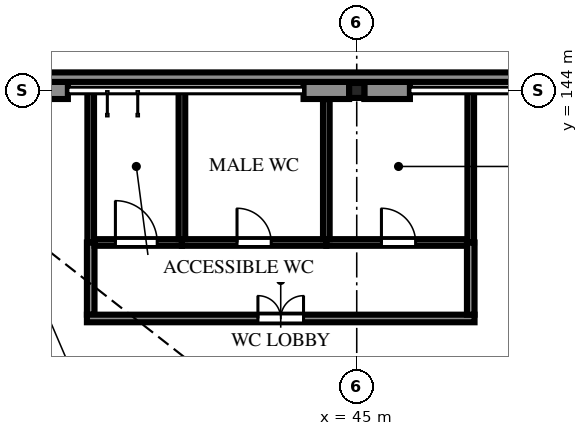
"""IFC4 building model, lengths in metres.
Left out: names, types, materials, properties, quantities, classifications, styles, units other than length and angle.
Written with IfcOpenShell. Run it as: python <this file> out.ifc"""

import sys

from ifc_helpers import new_model, si_unit, direction, frame, frame_2d, origin, origin_2d, place, context, subcontext, project, spatial, polyline, rectangle, i_section, outline, extrude, element, fill, save


model = new_model("IFC4")
c1 = context("Model", 3, precision=1e-05, world=origin(), true_north=direction((0.0, 1.0)))
c2 = subcontext(c1, "Body", "Model", "MODEL_VIEW")
j1 = project(units=[si_unit("LENGTHUNIT", "METRE"), si_unit("PLANEANGLEUNIT", "RADIAN")], contexts=[c1])
p1 = place(None, origin())
s1 = spatial("IfcSite", under=j1, at=p1, CompositionType="ELEMENT")
p2 = place(p1, origin())
s2 = spatial("IfcBuilding", under=s1, at=p2, CompositionType="ELEMENT")
p3 = place(p2, origin())
s3 = spatial("IfcBuildingStorey", under=s2, at=p3, CompositionType="ELEMENT", Elevation=0.0)
p4 = place(p3, frame((45.0, 144.0, -2.1), z_axis=(0.0, 0.0, 1.0), x_axis=(1.0, 0.0, 0.0)))
e1 = element("IfcColumn", 1, at=p4, inside=s3, PredefinedType="COLUMN", context=c2, shape_type="SweptSolid", body=[
    extrude(i_section(OverallWidth=0.399, OverallDepth=0.394, WebThickness=0.016, FlangeThickness=0.025, FilletRadius=0.015, at=origin_2d()), origin(), (0.0, 0.0, 1.0), 9.6),
])
for number, where, z_axis, x_axis in (
    (2, (36.199, 144.0, 0.0), (0.0, 0.0, 1.0), (1.0, 0.0, 0.0)),
    (3, (43.601, 144.0, 0.0), (0.0, 0.0, 1.0), (1.0, 0.0, 0.0)),
    (4, (45.199, 144.0, 0.0), (0.0, 0.0, 1.0), (1.0, 0.0, 0.0)),
):
    element("IfcWall", number, at=place(p3, frame(where, z_axis=z_axis, x_axis=x_axis)), inside=s3, PredefinedType="SOLIDWALL", context=c2, shape_type="SweptSolid", body=[
        extrude(rectangle(XDim=1.2, YDim=0.45, at=frame_2d((0.6, 0.0))), origin(), (0.0, 0.0, 1.0), 6.46),
    ])
p5 = place(p3, frame((33.15, 144.35, 0.0), z_axis=(0.0, 0.0, 1.0), x_axis=(1.0, 0.0, 0.0)))
e5 = element("IfcWall", 5, at=p5, inside=s3, PredefinedType="SOLIDWALL", context=c2, shape_type="SweptSolid", body=[
    extrude(outline(polyline([(4.25, 0.0), (4.25, 3.3), (4.374, 4.028), (4.87, 4.652), (5.304, 4.808), (5.676, 5.224), (6.482, 5.64), (7.35, 5.9), (8.218, 5.64), (9.024, 5.224), (9.396, 4.808), (9.83, 4.652), (10.326, 4.028), (10.45, 3.3), (10.45, 0.0), (13.25, 0.0), (13.25, 3.3), (13.374, 4.028), (13.87, 4.652), (14.304, 4.808), (14.676, 5.224), (15.482, 5.64), (16.35, 5.9), (17.218, 5.64), (18.024, 5.224), (18.396, 4.808), (18.83, 4.652), (19.326, 4.028), (19.45, 3.3), (19.45, 0.0), (20.85, 0.0), (20.85, 6.46), (0.0, 6.46), (0.0, 0.0), (4.25, 0.0)])), frame((0.0, 0.125, 0.0), z_axis=(0.0, -1.0, 0.0), x_axis=(1.0, 0.0, 0.0)), (0.0, 0.0, 1.0), 0.25),
])
p6 = place(p3, frame((38.0, 140.0, 0.0), z_axis=(0.0, 0.0, 1.0), x_axis=(0.0, -1.0, 0.0)))
e6 = element("IfcWall", 6, at=p6, inside=s3, PredefinedType="PARTITIONING", context=c2, shape_type="SweptSolid", body=[
    extrude(rectangle(XDim=1.9, YDim=0.2, at=frame_2d((0.95, 0.0))), origin(), (0.0, 0.0, 1.0), 6.6),
])
p7 = place(p3, frame((37.9, 138.0, 0.0), z_axis=(0.0, 0.0, 1.0), x_axis=(1.0, 0.0, 0.0)))
e7 = element("IfcWall", 7, at=p7, inside=s3, PredefinedType="PARTITIONING", context=c2, shape_type="SweptSolid", body=[
    extrude(rectangle(XDim=10.2, YDim=0.2, at=frame_2d((5.1, 0.0))), origin(), (0.0, 0.0, 1.0), 6.6),
])
p8 = place(p7, frame((4.5, 0.0, 0.0)))
e8 = element("IfcOpeningElement", 8, at=p8, cuts=e7, PredefinedType="OPENING", context=c2, shape_type="SweptSolid", body=[
    extrude(rectangle(XDim=1.2, YDim=2.1, at=frame_2d((0.6, 1.05))), frame((0.0, 0.11, 0.0), z_axis=(0.0, -1.0, 0.0), x_axis=(1.0, 0.0, 0.0)), (0.0, 0.0, 1.0), 0.22),
])
p9 = place(p3, frame((48.0, 138.1, 0.0), z_axis=(0.0, 0.0, 1.0), x_axis=(0.0, 1.0, 0.0)))
e9 = element("IfcWall", 9, at=p9, inside=s3, PredefinedType="PARTITIONING", context=c2, shape_type="SweptSolid", body=[
    extrude(rectangle(XDim=1.9, YDim=0.2, at=frame_2d((0.95, 0.0))), origin(), (0.0, 0.0, 1.0), 6.6),
])
for number, where, z_axis, x_axis in (
    (10, (38.0, 144.0, 0.0), (0.0, 0.0, 1.0), (0.0, -1.0, 0.0)),
    (11, (48.0, 140.0, 0.0), (0.0, 0.0, 1.0), (0.0, 1.0, 0.0)),
):
    element("IfcWall", number, at=place(p3, frame(where, z_axis=z_axis, x_axis=x_axis)), inside=s3, PredefinedType="PARTITIONING", context=c2, shape_type="SweptSolid", body=[
        extrude(rectangle(XDim=4.0, YDim=0.175, at=frame_2d((2.0, 0.0))), origin(), (0.0, 0.0, 1.0), 6.459),
    ])
p10 = place(p3, frame((38.1, 140.0, 0.0), z_axis=(0.0, 0.0, 1.0), x_axis=(1.0, 0.0, 0.0)))
e12 = element("IfcWall", 12, at=p10, inside=s3, PredefinedType="PARTITIONING", context=c2, shape_type="SweptSolid", body=[
    extrude(rectangle(XDim=2.3, YDim=0.175, at=frame_2d((1.15, 0.0))), origin(), (0.0, 0.0, 1.0), 6.459),
])
p11 = place(p10, frame((0.55, 0.0, 0.0)))
e13 = element("IfcOpeningElement", 13, at=p11, cuts=e12, PredefinedType="OPENING", context=c2, shape_type="SweptSolid", body=[
    extrude(rectangle(XDim=1.1, YDim=2.1, at=frame_2d((0.55, 1.05))), frame((0.0, 0.097, 0.0), z_axis=(0.0, -1.0, 0.0), x_axis=(1.0, 0.0, 0.0)), (0.0, 0.0, 1.0), 0.195),
])
p12 = place(p3, frame((40.4, 140.0, 0.0), z_axis=(0.0, 0.0, 1.0), x_axis=(1.0, 0.0, 0.0)))
e14 = element("IfcWall", 14, at=p12, inside=s3, PredefinedType="PARTITIONING", context=c2, shape_type="SweptSolid", body=[
    extrude(rectangle(XDim=3.8, YDim=0.175, at=frame_2d((1.9, 0.0))), origin(), (0.0, 0.0, 1.0), 6.459),
])
p13 = place(p12, frame((1.45, 0.0, 0.0)))
e15 = element("IfcOpeningElement", 15, at=p13, cuts=e14, PredefinedType="OPENING", context=c2, shape_type="SweptSolid", body=[
    extrude(rectangle(XDim=0.9, YDim=2.1, at=frame_2d((0.45, 1.05))), frame((0.0, 0.097, 0.0), z_axis=(0.0, -1.0, 0.0), x_axis=(1.0, 0.0, 0.0)), (0.0, 0.0, 1.0), 0.195),
])
p14 = place(p3, frame((44.2, 140.0, 0.0), z_axis=(0.0, 0.0, 1.0), x_axis=(1.0, 0.0, 0.0)))
e16 = element("IfcWall", 16, at=p14, inside=s3, PredefinedType="PARTITIONING", context=c2, shape_type="SweptSolid", body=[
    extrude(rectangle(XDim=3.7, YDim=0.175, at=frame_2d((1.85, 0.0))), origin(), (0.0, 0.0, 1.0), 6.459),
])
p15 = place(p14, frame((1.45, 0.0, 0.0)))
e17 = element("IfcOpeningElement", 17, at=p15, cuts=e16, PredefinedType="OPENING", context=c2, shape_type="SweptSolid", body=[
    extrude(rectangle(XDim=0.9, YDim=2.1, at=frame_2d((0.45, 1.05))), frame((0.0, 0.097, 0.0), z_axis=(0.0, -1.0, 0.0), x_axis=(1.0, 0.0, 0.0)), (0.0, 0.0, 1.0), 0.195),
])
p16 = place(p3, frame((40.4, 144.0, 0.0), z_axis=(0.0, 0.0, 1.0), x_axis=(0.0, -1.0, 0.0)))
e18 = element("IfcWall", 18, at=p16, inside=s3, PredefinedType="PARTITIONING", context=c2, shape_type="SweptSolid", body=[
    extrude(rectangle(XDim=3.913, YDim=0.175, at=frame_2d((1.956, 0.0))), origin(), (0.0, 0.0, 1.0), 6.459),
])
p17 = place(p3, frame((44.2, 143.773, 0.0), z_axis=(0.0, 0.0, 1.0), x_axis=(0.0, -1.0, 0.0)))
e19 = element("IfcWall", 19, at=p17, inside=s3, PredefinedType="PARTITIONING", context=c2, shape_type="SweptSolid", body=[
    extrude(rectangle(XDim=3.686, YDim=0.175, at=frame_2d((1.843, 0.0))), origin(), (0.0, 0.0, 1.0), 6.459),
])
p18 = place(p8, origin())
e20 = element("IfcDoor", 20, at=p18, inside=s3, OperationType="DOUBLE_DOOR_SINGLE_SWING", PredefinedType="DOOR", context=c2, shape_type="SweptSolid", body=[
    extrude(outline(polyline([(0.0, 0.0), (0.07, 0.0), (0.07, 2.03), (1.13, 2.03), (1.13, 0.0), (1.2, 0.0), (1.2, 2.1), (0.0, 2.1), (0.0, 0.0)])), frame((0.0, 0.025, 0.0), z_axis=(0.0, -1.0, 0.0), x_axis=(1.0, 0.0, 0.0)), (0.0, 0.0, 1.0), 0.05),
    extrude(outline(polyline([(0.074, 0.01), (0.597, 0.01), (0.597, 2.026), (0.074, 2.026), (0.074, 0.01)]), holes=[polyline([(0.178, 0.373), (0.492, 0.373), (0.492, 1.784), (0.178, 1.784), (0.178, 0.373)])]), frame((0.0, 0.017, 0.0), z_axis=(0.0, -1.0, 0.0), x_axis=(1.0, 0.0, 0.0)), (0.0, 0.0, 1.0), 0.035),
    extrude(rectangle(XDim=0.314, YDim=1.411, at=frame_2d((0.335, 1.079))), frame((0.0, 0.009, 0.0), z_axis=(0.0, -1.0, 0.0), x_axis=(1.0, 0.0, 0.0)), (0.0, 0.0, 1.0), 0.017),
    extrude(outline(polyline([(0.603, 0.01), (1.126, 0.01), (1.126, 2.026), (0.603, 2.026), (0.603, 0.01)]), holes=[polyline([(0.708, 0.373), (1.021, 0.373), (1.021, 1.784), (0.708, 1.784), (0.708, 0.373)])]), frame((0.0, 0.017, 0.0), z_axis=(0.0, -1.0, 0.0), x_axis=(1.0, 0.0, 0.0)), (0.0, 0.0, 1.0), 0.035),
    extrude(rectangle(XDim=0.314, YDim=1.411, at=frame_2d((0.865, 1.079))), frame((0.0, 0.009, 0.0), z_axis=(0.0, -1.0, 0.0), x_axis=(1.0, 0.0, 0.0)), (0.0, 0.0, 1.0), 0.017),
])
fill(e8, e20)
p19 = place(p11, origin())
e21 = element("IfcDoor", 21, at=p19, inside=s3, OperationType="SINGLE_SWING_LEFT", PredefinedType="DOOR", context=c2, shape_type="SweptSolid", body=[
    extrude(outline(polyline([(0.0, 0.0), (0.07, 0.0), (0.07, 2.03), (1.03, 2.03), (1.03, 0.0), (1.1, 0.0), (1.1, 2.1), (0.0, 2.1), (0.0, 0.0)])), frame((0.0, 0.025, 0.0), z_axis=(0.0, -1.0, 0.0), x_axis=(1.0, 0.0, 0.0)), (0.0, 0.0, 1.0), 0.05),
    extrude(outline(polyline([(0.074, 0.01), (1.026, 0.01), (1.026, 2.026), (0.074, 2.026), (0.074, 0.01)]), holes=[polyline([(0.194, 0.16), (0.906, 0.16), (0.906, 1.01), (0.194, 1.01), (0.194, 0.16)]), polyline([(0.4, 1.16), (0.7, 1.16), (0.7, 1.76), (0.4, 1.76), (0.4, 1.16)])]), frame((0.0, 0.017, 0.0), z_axis=(0.0, -1.0, 0.0), x_axis=(1.0, 0.0, 0.0)), (0.0, 0.0, 1.0), 0.035),
    extrude(rectangle(XDim=0.712, YDim=0.85, at=frame_2d((0.55, 0.585))), frame((0.0, 0.009, 0.0), z_axis=(0.0, -1.0, 0.0), x_axis=(1.0, 0.0, 0.0)), (0.0, 0.0, 1.0), 0.017),
    extrude(rectangle(XDim=0.3, YDim=0.6, at=frame_2d((0.55, 1.46))), frame((0.0, 0.006, 0.0), z_axis=(0.0, -1.0, 0.0), x_axis=(1.0, 0.0, 0.0)), (0.0, 0.0, 1.0), 0.012),
])
fill(e13, e21)
p20 = place(p13, origin())
e22 = element("IfcDoor", 22, at=p20, inside=s3, OperationType="SINGLE_SWING_LEFT", PredefinedType="DOOR", context=c2, shape_type="SweptSolid", body=[
    extrude(outline(polyline([(0.0, 0.0), (0.07, 0.0), (0.07, 2.03), (0.83, 2.03), (0.83, 0.0), (0.9, 0.0), (0.9, 2.1), (0.0, 2.1), (0.0, 0.0)])), frame((0.0, 0.025, 0.0), z_axis=(0.0, -1.0, 0.0), x_axis=(1.0, 0.0, 0.0)), (0.0, 0.0, 1.0), 0.05),
    extrude(outline(polyline([(0.074, 0.01), (0.826, 0.01), (0.826, 2.026), (0.074, 2.026), (0.074, 0.01)]), holes=[polyline([(0.194, 0.16), (0.706, 0.16), (0.706, 1.01), (0.194, 1.01), (0.194, 0.16)]), polyline([(0.3, 1.16), (0.6, 1.16), (0.6, 1.76), (0.3, 1.76), (0.3, 1.16)])]), frame((0.0, 0.017, 0.0), z_axis=(0.0, -1.0, 0.0), x_axis=(1.0, 0.0, 0.0)), (0.0, 0.0, 1.0), 0.035),
    extrude(rectangle(XDim=0.512, YDim=0.85, at=frame_2d((0.45, 0.585))), frame((0.0, 0.009, 0.0), z_axis=(0.0, -1.0, 0.0), x_axis=(1.0, 0.0, 0.0)), (0.0, 0.0, 1.0), 0.017),
    extrude(rectangle(XDim=0.3, YDim=0.6, at=frame_2d((0.45, 1.46))), frame((0.0, 0.006, 0.0), z_axis=(0.0, -1.0, 0.0), x_axis=(1.0, 0.0, 0.0)), (0.0, 0.0, 1.0), 0.012),
])
fill(e15, e22)
p21 = place(p15, origin())
e23 = element("IfcDoor", 23, at=p21, inside=s3, OperationType="SINGLE_SWING_LEFT", PredefinedType="DOOR", context=c2, shape_type="SweptSolid", body=[
    extrude(outline(polyline([(0.0, 0.0), (0.07, 0.0), (0.07, 2.03), (0.83, 2.03), (0.83, 0.0), (0.9, 0.0), (0.9, 2.1), (0.0, 2.1), (0.0, 0.0)])), frame((0.0, 0.025, 0.0), z_axis=(0.0, -1.0, 0.0), x_axis=(1.0, 0.0, 0.0)), (0.0, 0.0, 1.0), 0.05),
    extrude(outline(polyline([(0.074, 0.01), (0.826, 0.01), (0.826, 2.026), (0.074, 2.026), (0.074, 0.01)]), holes=[polyline([(0.194, 0.16), (0.706, 0.16), (0.706, 1.01), (0.194, 1.01), (0.194, 0.16)]), polyline([(0.3, 1.16), (0.6, 1.16), (0.6, 1.76), (0.3, 1.76), (0.3, 1.16)])]), frame((0.0, 0.017, 0.0), z_axis=(0.0, -1.0, 0.0), x_axis=(1.0, 0.0, 0.0)), (0.0, 0.0, 1.0), 0.035),
    extrude(rectangle(XDim=0.512, YDim=0.85, at=frame_2d((0.45, 0.585))), frame((0.0, 0.009, 0.0), z_axis=(0.0, -1.0, 0.0), x_axis=(1.0, 0.0, 0.0)), (0.0, 0.0, 1.0), 0.017),
    extrude(rectangle(XDim=0.3, YDim=0.6, at=frame_2d((0.45, 1.46))), frame((0.0, 0.006, 0.0), z_axis=(0.0, -1.0, 0.0), x_axis=(1.0, 0.0, 0.0)), (0.0, 0.0, 1.0), 0.012),
])
fill(e17, e23)
save(model, sys.argv[1])
